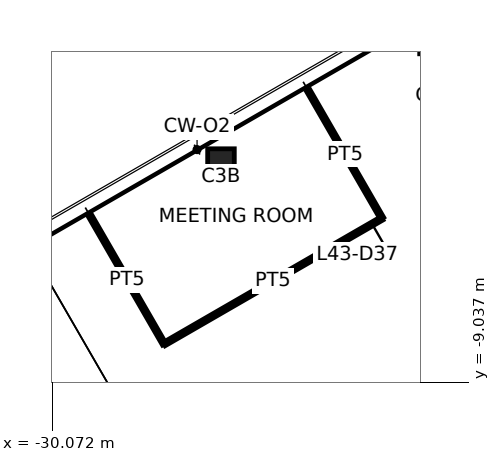
"""IFC4 building model, lengths in metres.
Left out: names, types, materials, properties, quantities, classifications, styles, units other than length and angle.
Written with IfcOpenShell. Run it as: python <this file> out.ifc"""

import sys

from ifc_helpers import new_model, si_unit, direction, frame, frame_2d, origin, origin_2d, place, context, subcontext, project, spatial, rectangle, hollow_rectangle, extrude, element, fill, save


model = new_model("IFC4")
c1 = context("Model", 3, precision=1e-05, world=origin(), true_north=direction((0.0, 1.0)))
c2 = subcontext(c1, "Body", "Model", "MODEL_VIEW")
j1 = project(units=[si_unit("LENGTHUNIT", "METRE"), si_unit("PLANEANGLEUNIT", "RADIAN")], contexts=[c1])
p1 = place(None, origin())
s1 = spatial("IfcSite", under=j1, at=p1, CompositionType="ELEMENT")
p2 = place(p1, origin())
s2 = spatial("IfcBuilding", under=s1, at=p2, CompositionType="ELEMENT")
p3 = place(p2, frame((0.0, 0.0, 172.1)))
s3 = spatial("IfcBuildingStorey", under=s2, at=p3, CompositionType="ELEMENT", Elevation=172.1)
p4 = place(p3, frame((-20.0, 0.0, 0.0), z_axis=(0.0, 0.0, 1.0), x_axis=(1.0, 0.0, 0.0)))
e1 = element("IfcColumn", 1, at=p4, inside=s3, PredefinedType="COLUMN", context=c2, shape_type="SweptSolid", body=[
    extrude(hollow_rectangle(XDim=0.8, YDim=0.8, WallThickness=0.045, at=origin_2d()), origin(), (0.0, 0.0, 1.0), 3.9),
])
p5 = place(p3, frame((-25.629, -3.25, 0.0), z_axis=(0.0, 0.0, 1.0), x_axis=(1.0, 0.0, 0.0)))
e2 = element("IfcColumn", 2, at=p5, inside=s3, PredefinedType="COLUMN", context=c2, shape_type="SweptSolid", body=[
    extrude(hollow_rectangle(XDim=0.7, YDim=0.7, WallThickness=0.036, at=origin_2d()), origin(), (0.0, 0.0, 1.0), 3.9),
])
p6 = place(p3, frame((-16.039, -9.26, 0.0), z_axis=(0.0, 0.0, 1.0), x_axis=(-0.866024837091, -0.50000098154, 0.0)))
e3 = element("IfcWall", 3, at=p6, inside=s3, PredefinedType="SHEAR", context=c2, shape_type="SweptSolid", body=[
    extrude(rectangle(XDim=13.0, YDim=0.7, at=frame_2d((6.5, 0.0))), origin(), (0.0, 0.0, 1.0), 3.9),
])
p7 = place(p3, frame((-27.125, -8.04, 0.0), z_axis=(0.0, 0.0, 1.0), x_axis=(-0.499978621081, 0.866037746557, 0.0)))
e4 = element("IfcWall", 4, at=p7, inside=s3, PredefinedType="PARTITIONING", context=c2, shape_type="SweptSolid", body=[
    extrude(rectangle(XDim=3.905, YDim=0.1, at=frame_2d((1.953, 0.0))), origin(), (0.0, 0.0, 1.0), 2.95),
])
p8 = place(p3, frame((-23.332, -1.37, 0.0), z_axis=(0.0, 0.0, 1.0), x_axis=(0.500043804875, -0.866000111551, 0.0)))
e5 = element("IfcWall", 5, at=p8, inside=s3, PredefinedType="PARTITIONING", context=c2, shape_type="SweptSolid", body=[
    extrude(rectangle(XDim=3.88, YDim=0.1, at=frame_2d((1.94, 0.0))), origin(), (0.0, 0.0, 1.0), 2.95),
])
p9 = place(p3, frame((-21.392, -4.73, 0.0), z_axis=(0.0, 0.0, 1.0), x_axis=(-0.866030817826, -0.499990622488, 0.0)))
e6 = element("IfcWall", 6, at=p9, inside=s3, PredefinedType="PARTITIONING", context=c2, shape_type="SweptSolid", body=[
    extrude(rectangle(XDim=6.62, YDim=0.1, at=frame_2d((3.31, 0.0))), origin(), (0.0, 0.0, 1.0), 2.95),
])
p10 = place(p9, frame((0.3, 0.0, 0.0)))
e7 = element("IfcOpeningElement", 7, at=p10, cuts=e6, PredefinedType="OPENING", context=c2, shape_type="SweptSolid", body=[
    extrude(rectangle(XDim=0.9, YDim=2.1, at=frame_2d((0.45, 1.05))), frame((0.0, 0.06, 0.0), z_axis=(0.0, -1.0, 0.0), x_axis=(1.0, 0.0, 0.0)), (0.0, 0.0, 1.0), 0.12),
])
p11 = place(p10, origin())
e8 = element("IfcDoor", 8, at=p11, inside=s3, OperationType="SINGLE_SWING_LEFT", PredefinedType="DOOR", context=c2, shape_type="SweptSolid", body=[
    extrude(rectangle(XDim=0.9, YDim=2.1, at=frame_2d((0.45, 1.05))), frame((0.0, 0.025, 0.0), z_axis=(0.0, -1.0, 0.0), x_axis=(1.0, 0.0, 0.0)), (0.0, 0.0, 1.0), 0.05),
])
fill(e7, e8)
save(model, sys.argv[1])
